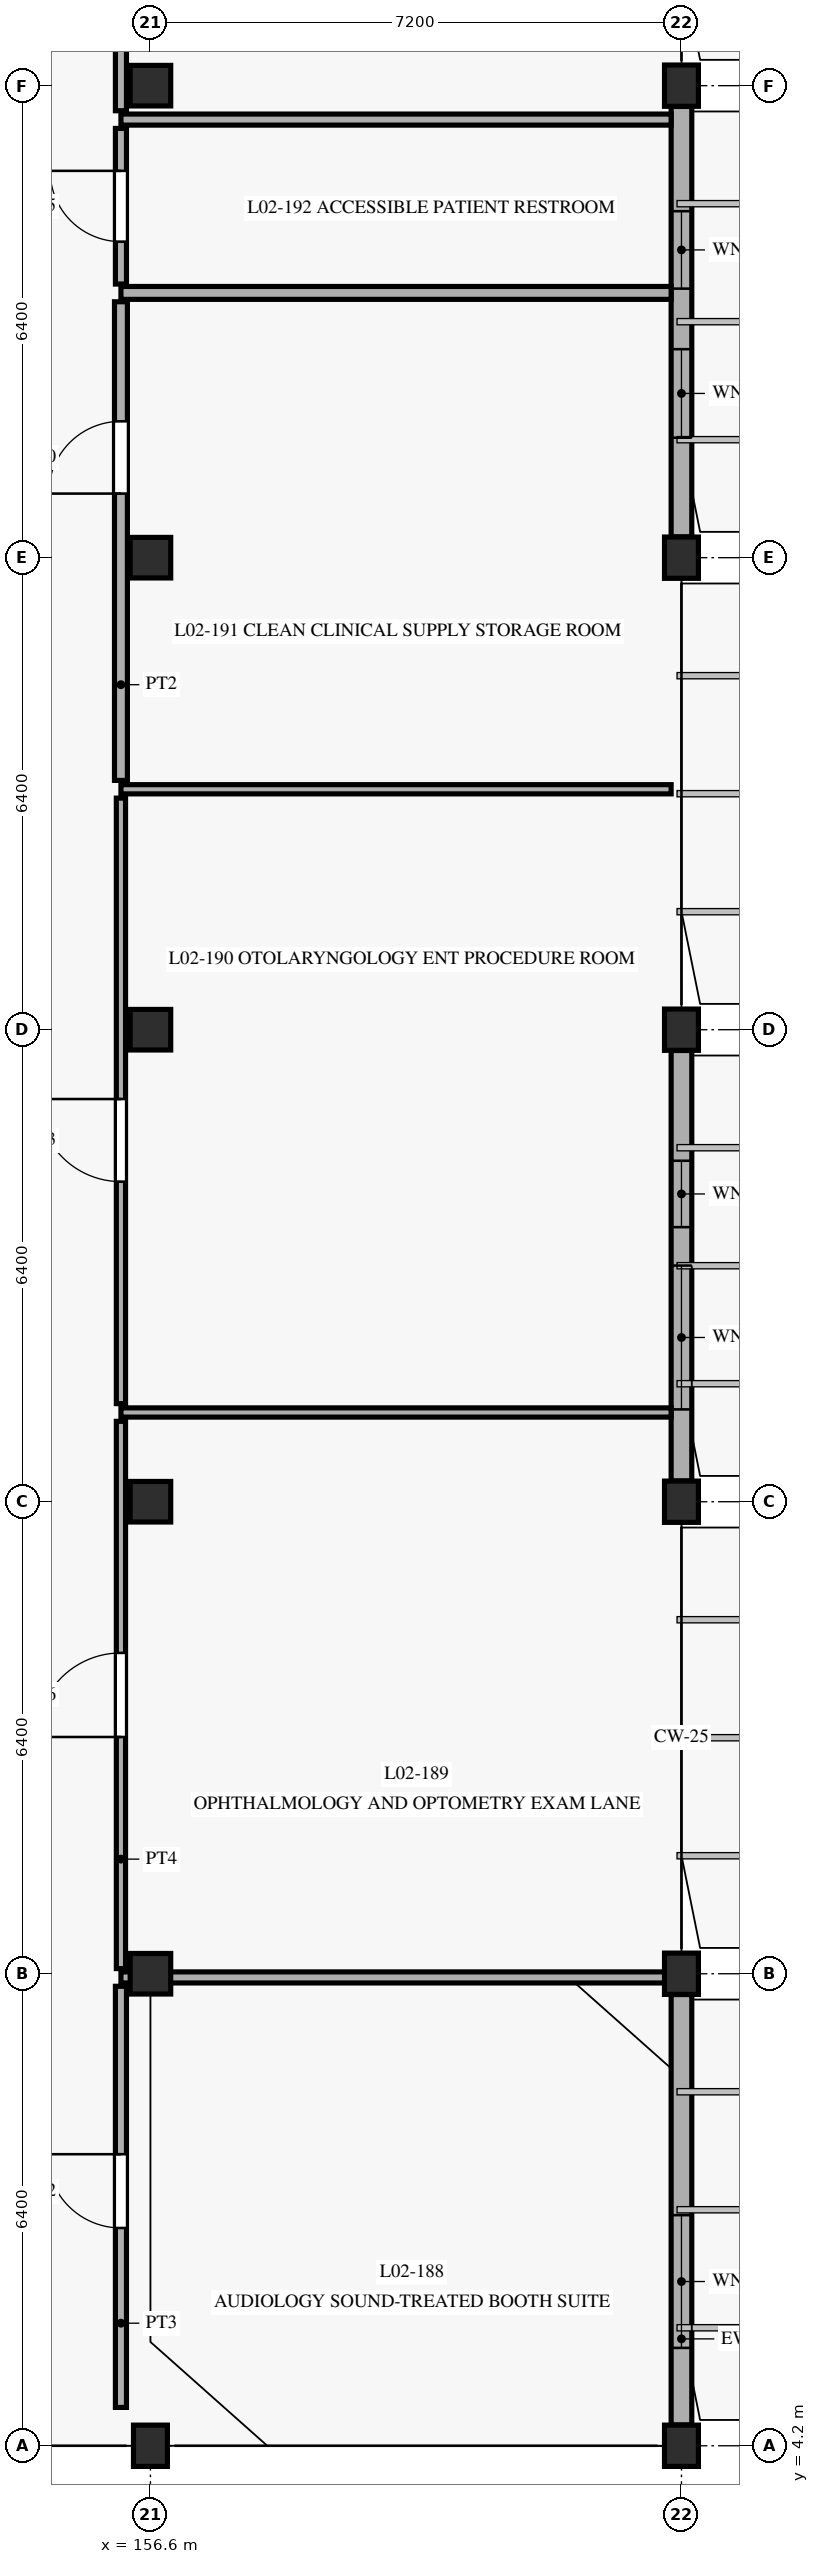
"""IFC4 building model, lengths in metres.
Left out: names, types, materials, properties, quantities, classifications, styles, units other than length and angle.
Written with IfcOpenShell. Run it as: python <this file> out.ifc"""

import sys

from ifc_helpers import new_model, si_unit, direction, frame, frame_2d, origin, origin_with_axes, origin_2d, place, context, subcontext, project, spatial, rectangle, extrude, element, fill, save


model = new_model("IFC4")
c1 = context("Model", 3, precision=1e-05, world=origin(), true_north=direction((0.0, 1.0)))
c2 = subcontext(c1, "Body", "Model", "MODEL_VIEW")
j1 = project(units=[si_unit("LENGTHUNIT", "METRE"), si_unit("PLANEANGLEUNIT", "RADIAN")], contexts=[c1])
p1 = place(None, origin())
s1 = spatial("IfcSite", under=j1, at=p1, CompositionType="ELEMENT")
p2 = place(p1, origin())
s2 = spatial("IfcBuilding", under=s1, at=p2, CompositionType="ELEMENT")
p3 = place(p2, frame((0.0, 0.0, 4.8)))
s3 = spatial("IfcBuildingStorey", under=s2, at=p3, CompositionType="ELEMENT", Elevation=4.8)
p4 = place(p3, frame((156.6, 4.2, 0.0), z_axis=(0.0, 0.0, 1.0), x_axis=(1.0, 0.0, 0.0)))
e1 = element("IfcColumn", 1, at=p4, inside=s3, PredefinedType="COLUMN", context=c2, shape_type="SweptSolid", body=[
    extrude(rectangle(XDim=0.46, YDim=0.56, at=origin_2d()), origin(), (0.0, 0.0, 1.0), 4.5),
])
for number, where, z_axis, x_axis in (
    (2, (156.6, 10.6, 0.0), (0.0, 0.0, 1.0), (1.0, 0.0, 0.0)),
    (3, (156.6, 17.0, 0.0), (0.0, 0.0, 1.0), (1.0, 0.0, 0.0)),
    (4, (156.6, 23.4, 0.0), (0.0, 0.0, 1.0), (1.0, 0.0, 0.0)),
    (5, (156.6, 29.8, 0.0), (0.0, 0.0, 1.0), (1.0, 0.0, 0.0)),
    (6, (156.6, 36.2, 0.0), (0.0, 0.0, 1.0), (1.0, 0.0, 0.0)),
):
    element("IfcColumn", number, at=place(p3, frame(where, z_axis=z_axis, x_axis=x_axis)), inside=s3, PredefinedType="COLUMN", context=c2, shape_type="SweptSolid", body=[
        extrude(rectangle(XDim=0.55, YDim=0.55, at=origin_2d()), origin(), (0.0, 0.0, 1.0), 4.5),
    ])
for number, where, z_axis, x_axis in (
    (7, (163.8, 4.2, 0.0), (0.0, 0.0, 1.0), (1.0, 0.0, 0.0)),
    (8, (163.8, 10.6, 0.0), (0.0, 0.0, 1.0), (1.0, 0.0, 0.0)),
    (9, (163.8, 17.0, 0.0), (0.0, 0.0, 1.0), (1.0, 0.0, 0.0)),
    (10, (163.8, 23.4, 0.0), (0.0, 0.0, 1.0), (1.0, 0.0, 0.0)),
    (11, (163.8, 29.8, 0.0), (0.0, 0.0, 1.0), (1.0, 0.0, 0.0)),
    (12, (163.8, 36.2, 0.0), (0.0, 0.0, 1.0), (1.0, 0.0, 0.0)),
):
    element("IfcColumn", number, at=place(p3, frame(where, z_axis=z_axis, x_axis=x_axis)), inside=s3, PredefinedType="COLUMN", context=c2, shape_type="SweptSolid", body=[
        extrude(rectangle(XDim=0.46, YDim=0.56, at=origin_2d()), origin(), (0.0, 0.0, 1.0), 4.5),
    ])
p5 = place(p3, frame((163.8, 4.482, 0.0), z_axis=(0.0, 0.0, 1.0), x_axis=(0.0, 1.0, 0.0)))
e13 = element("IfcWall", 13, at=p5, inside=s3, PredefinedType="SOLIDWALL", context=c2, shape_type="SweptSolid", body=[
    extrude(rectangle(XDim=5.836, YDim=0.28, at=frame_2d((2.918, 0.0))), origin(), (0.0, 0.0, 1.0), 3.65),
])
p6 = place(p5, frame((1.045, 0.0, 0.88)))
e14 = element("IfcOpeningElement", 14, at=p6, cuts=e13, PredefinedType="OPENING", context=c2, shape_type="SweptSolid", body=[
    extrude(rectangle(XDim=1.8, YDim=1.85, at=frame_2d((0.9, 0.925))), frame((0.0, 0.15, 0.0), z_axis=(0.0, -1.0, 0.0), x_axis=(1.0, 0.0, 0.0)), (0.0, 0.0, 1.0), 0.3),
])
p7 = place(p3, frame((163.8, 17.282, 0.0), z_axis=(0.0, 0.0, 1.0), x_axis=(0.0, 1.0, 0.0)))
e15 = element("IfcWall", 15, at=p7, inside=s3, PredefinedType="SOLIDWALL", context=c2, shape_type="SweptSolid", body=[
    extrude(rectangle(XDim=5.836, YDim=0.28, at=frame_2d((2.918, 0.0))), origin(), (0.0, 0.0, 1.0), 3.65),
])
p8 = place(p7, frame((0.97, 0.0, 0.88)))
e16 = element("IfcOpeningElement", 16, at=p8, cuts=e15, PredefinedType="OPENING", context=c2, shape_type="SweptSolid", body=[
    extrude(rectangle(XDim=1.95, YDim=1.85, at=frame_2d((0.975, 0.925))), frame((0.0, 0.15, 0.0), z_axis=(0.0, -1.0, 0.0), x_axis=(1.0, 0.0, 0.0)), (0.0, 0.0, 1.0), 0.3),
])
p9 = place(p7, frame((3.441, 0.0, 0.88)))
e17 = element("IfcOpeningElement", 17, at=p9, cuts=e15, PredefinedType="OPENING", context=c2, shape_type="SweptSolid", body=[
    extrude(rectangle(XDim=0.9, YDim=2.2, at=frame_2d((0.45, 1.1))), frame((0.0, 0.15, 0.0), z_axis=(0.0, -1.0, 0.0), x_axis=(1.0, 0.0, 0.0)), (0.0, 0.0, 1.0), 0.3),
])
p10 = place(p3, frame((163.8, 30.082, 0.0), z_axis=(0.0, 0.0, 1.0), x_axis=(0.0, 1.0, 0.0)))
e18 = element("IfcWall", 18, at=p10, inside=s3, PredefinedType="SOLIDWALL", context=c2, shape_type="SweptSolid", body=[
    extrude(rectangle(XDim=5.836, YDim=0.28, at=frame_2d((2.918, 0.0))), origin(), (0.0, 0.0, 1.0), 3.65),
])
p11 = place(p10, frame((1.345, 0.0, 0.88)))
e19 = element("IfcOpeningElement", 19, at=p11, cuts=e18, PredefinedType="OPENING", context=c2, shape_type="SweptSolid", body=[
    extrude(rectangle(XDim=1.2, YDim=2.05, at=frame_2d((0.6, 1.025))), frame((0.0, 0.15, 0.0), z_axis=(0.0, -1.0, 0.0), x_axis=(1.0, 0.0, 0.0)), (0.0, 0.0, 1.0), 0.3),
])
p12 = place(p10, frame((3.366, 0.0, 0.88)))
e20 = element("IfcOpeningElement", 20, at=p12, cuts=e18, PredefinedType="OPENING", context=c2, shape_type="SweptSolid", body=[
    extrude(rectangle(XDim=1.05, YDim=2.2, at=frame_2d((0.525, 1.1))), frame((0.0, 0.15, 0.0), z_axis=(0.0, -1.0, 0.0), x_axis=(1.0, 0.0, 0.0)), (0.0, 0.0, 1.0), 0.3),
])
p13 = place(p3, frame((156.2, 4.72, 0.0), z_axis=(0.0, 0.0, 1.0), x_axis=(0.0, 1.0, 0.0)))
e21 = element("IfcWall", 21, at=p13, inside=s3, PredefinedType="PARTITIONING", context=c2, shape_type="SweptSolid", body=[
    extrude(rectangle(XDim=5.71, YDim=0.15, at=frame_2d((2.855, 0.0))), origin(), (0.0, 0.0, 1.0), 3.795),
])
p14 = place(p13, frame((2.433, 0.0, 0.0)))
e22 = element("IfcOpeningElement", 22, at=p14, cuts=e21, PredefinedType="OPENING", context=c2, shape_type="SweptSolid", body=[
    extrude(rectangle(XDim=1.0, YDim=2.15, at=frame_2d((0.5, 1.075))), frame((0.0, 0.085, 0.0), z_axis=(0.0, -1.0, 0.0), x_axis=(1.0, 0.0, 0.0)), (0.0, 0.0, 1.0), 0.17),
])
p15 = place(p3, frame((156.2, 10.55, 0.0), z_axis=(0.0, 0.0, 1.0), x_axis=(1.0, 0.0, 0.0)))
e23 = element("IfcWall", 23, at=p15, inside=s3, PredefinedType="PARTITIONING", context=c2, shape_type="SweptSolid", body=[
    extrude(rectangle(XDim=7.46, YDim=0.15, at=frame_2d((3.73, 0.0))), origin(), (0.0, 0.0, 1.0), 3.795),
])
p16 = place(p3, frame((156.2, 10.67, 0.0), z_axis=(0.0, 0.0, 1.0), x_axis=(0.0, 1.0, 0.0)))
e24 = element("IfcWall", 24, at=p16, inside=s3, PredefinedType="PARTITIONING", context=c2, shape_type="SweptSolid", body=[
    extrude(rectangle(XDim=7.42, YDim=0.125, at=frame_2d((3.71, 0.0))), origin(), (0.0, 0.0, 1.0), 3.795),
])
p17 = place(p16, frame((3.14, 0.0, 0.0)))
e25 = element("IfcOpeningElement", 25, at=p17, cuts=e24, PredefinedType="OPENING", context=c2, shape_type="SweptSolid", body=[
    extrude(rectangle(XDim=1.14, YDim=2.22, at=frame_2d((0.57, 1.11))), frame((0.0, 0.073, 0.0), z_axis=(0.0, -1.0, 0.0), x_axis=(1.0, 0.0, 0.0)), (0.0, 0.0, 1.0), 0.145),
])
p18 = place(p3, frame((156.2, 18.21, 0.0), z_axis=(0.0, 0.0, 1.0), x_axis=(1.0, 0.0, 0.0)))
e26 = element("IfcWall", 26, at=p18, inside=s3, PredefinedType="PARTITIONING", context=c2, shape_type="SweptSolid", body=[
    extrude(rectangle(XDim=7.46, YDim=0.125, at=frame_2d((3.73, 0.0))), origin(), (0.0, 0.0, 1.0), 3.645),
])
p19 = place(p3, frame((156.2, 18.33, 0.0), z_axis=(0.0, 0.0, 1.0), x_axis=(0.0, 1.0, 0.0)))
e27 = element("IfcWall", 27, at=p19, inside=s3, PredefinedType="PARTITIONING", context=c2, shape_type="SweptSolid", body=[
    extrude(rectangle(XDim=8.21, YDim=0.125, at=frame_2d((4.105, 0.0))), origin(), (0.0, 0.0, 1.0), 3.545),
])
p20 = place(p19, frame((3.01, 0.0, 0.0)))
e28 = element("IfcOpeningElement", 28, at=p20, cuts=e27, PredefinedType="OPENING", context=c2, shape_type="SweptSolid", body=[
    extrude(rectangle(XDim=1.12, YDim=2.2, at=frame_2d((0.56, 1.1))), frame((0.0, 0.073, 0.0), z_axis=(0.0, -1.0, 0.0), x_axis=(1.0, 0.0, 0.0)), (0.0, 0.0, 1.0), 0.145),
])
p21 = place(p3, frame((156.2, 26.66, 0.0), z_axis=(0.0, 0.0, 1.0), x_axis=(1.0, 0.0, 0.0)))
e29 = element("IfcWall", 29, at=p21, inside=s3, PredefinedType="PARTITIONING", context=c2, shape_type="SweptSolid", body=[
    extrude(rectangle(XDim=7.46, YDim=0.125, at=frame_2d((3.73, 0.0))), origin(), (0.0, 0.0, 1.0), 3.645),
])
p22 = place(p3, frame((156.2, 26.78, 0.0), z_axis=(0.0, 0.0, 1.0), x_axis=(0.0, 1.0, 0.0)))
e30 = element("IfcWall", 30, at=p22, inside=s3, PredefinedType="PARTITIONING", context=c2, shape_type="SweptSolid", body=[
    extrude(rectangle(XDim=6.49, YDim=0.175, at=frame_2d((3.245, 0.0))), origin(), (0.0, 0.0, 1.0), 3.795),
])
p23 = place(p22, frame((3.889, 0.0, 0.0)))
e31 = element("IfcOpeningElement", 31, at=p23, cuts=e30, PredefinedType="OPENING", context=c2, shape_type="SweptSolid", body=[
    extrude(rectangle(XDim=0.98, YDim=2.12, at=frame_2d((0.49, 1.06))), frame((0.0, 0.098, 0.0), z_axis=(0.0, -1.0, 0.0), x_axis=(1.0, 0.0, 0.0)), (0.0, 0.0, 1.0), 0.195),
])
p24 = place(p3, frame((156.2, 33.39, 0.0), z_axis=(0.0, 0.0, 1.0), x_axis=(1.0, 0.0, 0.0)))
e32 = element("IfcWall", 32, at=p24, inside=s3, PredefinedType="PARTITIONING", context=c2, shape_type="SweptSolid", body=[
    extrude(rectangle(XDim=7.46, YDim=0.175, at=frame_2d((3.73, 0.0))), origin(), (0.0, 0.0, 1.0), 3.645),
])
p25 = place(p3, frame((156.2, 33.51, 0.0), z_axis=(0.0, 0.0, 1.0), x_axis=(0.0, 1.0, 0.0)))
e33 = element("IfcWall", 33, at=p25, inside=s3, PredefinedType="PARTITIONING", context=c2, shape_type="SweptSolid", body=[
    extrude(rectangle(XDim=2.11, YDim=0.15, at=frame_2d((1.055, 0.0))), origin(), (0.0, 0.0, 1.0), 4.195),
])
p26 = place(p25, frame((0.575, 0.0, 0.0)))
e34 = element("IfcOpeningElement", 34, at=p26, cuts=e33, PredefinedType="OPENING", context=c2, shape_type="SweptSolid", body=[
    extrude(rectangle(XDim=0.96, YDim=2.1, at=frame_2d((0.48, 1.05))), frame((0.0, 0.085, 0.0), z_axis=(0.0, -1.0, 0.0), x_axis=(1.0, 0.0, 0.0)), (0.0, 0.0, 1.0), 0.17),
])
p27 = place(p3, frame((156.2, 35.74, 0.0), z_axis=(0.0, 0.0, 1.0), x_axis=(1.0, 0.0, 0.0)))
e35 = element("IfcWall", 35, at=p27, inside=s3, PredefinedType="PARTITIONING", context=c2, shape_type="SweptSolid", body=[
    extrude(rectangle(XDim=7.46, YDim=0.15, at=frame_2d((3.73, 0.0))), origin(), (0.0, 0.0, 1.0), 3.645),
])
p28 = place(p3, frame((156.2, 35.86, 0.0), z_axis=(0.0, 0.0, 1.0), x_axis=(0.0, 1.0, 0.0)))
e36 = element("IfcWall", 36, at=p28, inside=s3, PredefinedType="PARTITIONING", context=c2, shape_type="SweptSolid", body=[
    extrude(rectangle(XDim=6.14, YDim=0.15, at=frame_2d((3.07, 0.0))), origin(), (0.0, 0.0, 1.0), 4.195),
])
p29 = place(p28, frame((2.57, 0.0, 0.0)))
e37 = element("IfcOpeningElement", 37, at=p29, cuts=e36, PredefinedType="OPENING", context=c2, shape_type="SweptSolid", body=[
    extrude(rectangle(XDim=1.0, YDim=2.15, at=frame_2d((0.5, 1.075))), frame((0.0, 0.085, 0.0), z_axis=(0.0, -1.0, 0.0), x_axis=(1.0, 0.0, 0.0)), (0.0, 0.0, 1.0), 0.17),
])
p30 = place(p6, origin_with_axes())
e38 = element("IfcWindow", 38, at=p30, inside=s3, PartitioningType="SINGLE_PANEL", PredefinedType="WINDOW", context=c2, shape_type="SweptSolid", body=[
    extrude(rectangle(XDim=1.8, YDim=1.85, at=frame_2d((0.9, 0.925))), frame((0.0, 0.03, 0.0), z_axis=(0.0, -1.0, 0.0), x_axis=(1.0, 0.0, 0.0)), (0.0, 0.0, 1.0), 0.06),
])
fill(e14, e38)
p31 = place(p8, origin_with_axes())
e39 = element("IfcWindow", 39, at=p31, inside=s3, PartitioningType="SINGLE_PANEL", PredefinedType="WINDOW", context=c2, shape_type="SweptSolid", body=[
    extrude(rectangle(XDim=1.95, YDim=1.85, at=frame_2d((0.975, 0.925))), frame((0.0, 0.03, 0.0), z_axis=(0.0, -1.0, 0.0), x_axis=(1.0, 0.0, 0.0)), (0.0, 0.0, 1.0), 0.06),
])
fill(e16, e39)
p32 = place(p9, origin_with_axes())
e40 = element("IfcWindow", 40, at=p32, inside=s3, PartitioningType="SINGLE_PANEL", PredefinedType="WINDOW", context=c2, shape_type="SweptSolid", body=[
    extrude(rectangle(XDim=0.9, YDim=2.2, at=frame_2d((0.45, 1.1))), frame((0.0, 0.03, 0.0), z_axis=(0.0, -1.0, 0.0), x_axis=(1.0, 0.0, 0.0)), (0.0, 0.0, 1.0), 0.06),
])
fill(e17, e40)
p33 = place(p11, origin_with_axes())
e41 = element("IfcWindow", 41, at=p33, inside=s3, PartitioningType="SINGLE_PANEL", PredefinedType="WINDOW", context=c2, shape_type="SweptSolid", body=[
    extrude(rectangle(XDim=1.2, YDim=2.05, at=frame_2d((0.6, 1.025))), frame((0.0, 0.03, 0.0), z_axis=(0.0, -1.0, 0.0), x_axis=(1.0, 0.0, 0.0)), (0.0, 0.0, 1.0), 0.06),
])
fill(e19, e41)
p34 = place(p12, origin_with_axes())
e42 = element("IfcWindow", 42, at=p34, inside=s3, PartitioningType="SINGLE_PANEL", PredefinedType="WINDOW", context=c2, shape_type="SweptSolid", body=[
    extrude(rectangle(XDim=1.05, YDim=2.2, at=frame_2d((0.525, 1.1))), frame((0.0, 0.03, 0.0), z_axis=(0.0, -1.0, 0.0), x_axis=(1.0, 0.0, 0.0)), (0.0, 0.0, 1.0), 0.06),
])
fill(e20, e42)
p35 = place(p14, frame((1.0, 0.0, 0.0), z_axis=(0.0, 0.0, 1.0), x_axis=(-1.0, 0.0, 0.0)))
e43 = element("IfcDoor", 43, at=p35, inside=s3, OperationType="SINGLE_SWING_LEFT", PredefinedType="DOOR", context=c2, shape_type="SweptSolid", body=[
    extrude(rectangle(XDim=1.0, YDim=2.15, at=frame_2d((0.5, 1.075))), frame((0.0, 0.025, 0.0), z_axis=(0.0, -1.0, 0.0), x_axis=(1.0, 0.0, 0.0)), (0.0, 0.0, 1.0), 0.05),
])
fill(e22, e43)
p36 = place(p17, frame((1.14, 0.0, 0.0), z_axis=(0.0, 0.0, 1.0), x_axis=(-1.0, 0.0, 0.0)))
e44 = element("IfcDoor", 44, at=p36, inside=s3, OperationType="SINGLE_SWING_RIGHT", PredefinedType="DOOR", context=c2, shape_type="SweptSolid", body=[
    extrude(rectangle(XDim=1.14, YDim=2.22, at=frame_2d((0.57, 1.11))), frame((0.0, 0.025, 0.0), z_axis=(0.0, -1.0, 0.0), x_axis=(1.0, 0.0, 0.0)), (0.0, 0.0, 1.0), 0.05),
])
fill(e25, e44)
p37 = place(p20, frame((1.12, 0.0, 0.0), z_axis=(0.0, 0.0, 1.0), x_axis=(-1.0, 0.0, 0.0)))
e45 = element("IfcDoor", 45, at=p37, inside=s3, OperationType="SINGLE_SWING_LEFT", PredefinedType="DOOR", context=c2, shape_type="SweptSolid", body=[
    extrude(rectangle(XDim=1.12, YDim=2.2, at=frame_2d((0.56, 1.1))), frame((0.0, 0.025, 0.0), z_axis=(0.0, -1.0, 0.0), x_axis=(1.0, 0.0, 0.0)), (0.0, 0.0, 1.0), 0.05),
])
fill(e28, e45)
p38 = place(p23, frame((0.98, 0.0, 0.0), z_axis=(0.0, 0.0, 1.0), x_axis=(-1.0, 0.0, 0.0)))
e46 = element("IfcDoor", 46, at=p38, inside=s3, OperationType="SINGLE_SWING_RIGHT", PredefinedType="DOOR", context=c2, shape_type="SweptSolid", body=[
    extrude(rectangle(XDim=0.98, YDim=2.12, at=frame_2d((0.49, 1.06))), frame((0.0, 0.025, 0.0), z_axis=(0.0, -1.0, 0.0), x_axis=(1.0, 0.0, 0.0)), (0.0, 0.0, 1.0), 0.05),
])
fill(e31, e46)
p39 = place(p26, frame((0.96, 0.0, 0.0), z_axis=(0.0, 0.0, 1.0), x_axis=(-1.0, 0.0, 0.0)))
e47 = element("IfcDoor", 47, at=p39, inside=s3, OperationType="SINGLE_SWING_LEFT", PredefinedType="DOOR", context=c2, shape_type="SweptSolid", body=[
    extrude(rectangle(XDim=0.96, YDim=2.1, at=frame_2d((0.48, 1.05))), frame((0.0, 0.025, 0.0), z_axis=(0.0, -1.0, 0.0), x_axis=(1.0, 0.0, 0.0)), (0.0, 0.0, 1.0), 0.05),
])
fill(e34, e47)
save(model, sys.argv[1])
